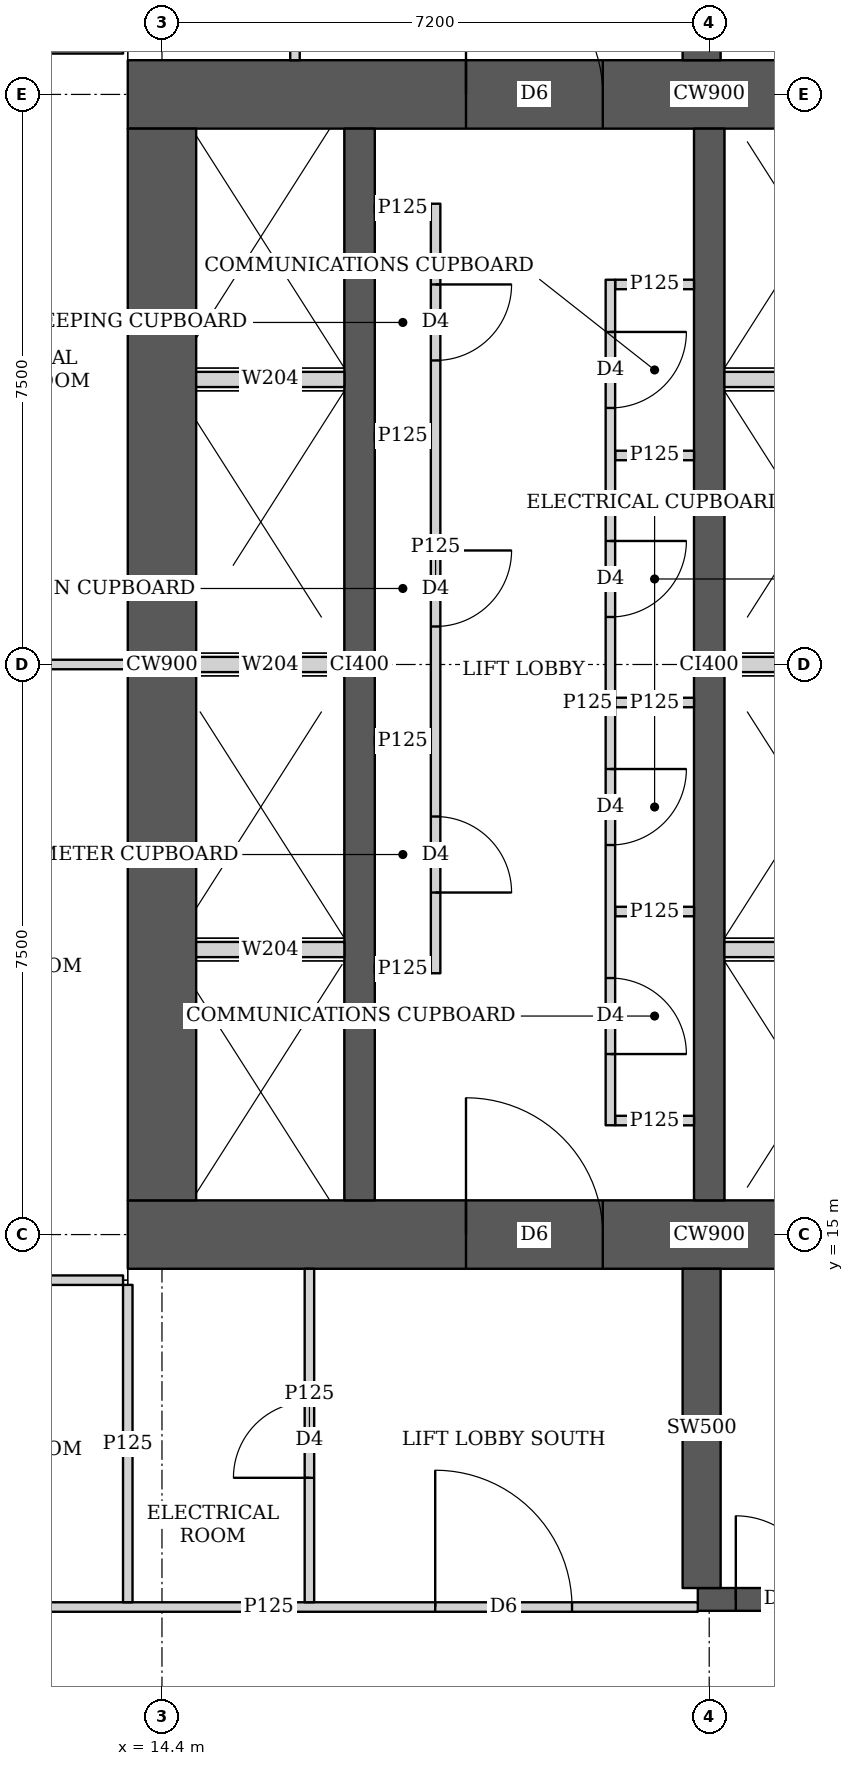
"""IFC4 building model, lengths in metres.
Left out: names, types, materials, properties, quantities, classifications, styles, units other than length and angle.
Written with IfcOpenShell. Run it as: python <this file> out.ifc"""

import sys

from ifc_helpers import new_model, si_unit, direction, frame, frame_2d, origin, place, context, subcontext, project, spatial, rectangle, extrude, element, fill, save


model = new_model("IFC4")
c1 = context("Model", 3, precision=1e-05, world=origin(), true_north=direction((0.0, 1.0)))
c2 = subcontext(c1, "Body", "Model", "MODEL_VIEW")
j1 = project(units=[si_unit("LENGTHUNIT", "METRE"), si_unit("PLANEANGLEUNIT", "RADIAN")], contexts=[c1])
p1 = place(None, origin())
s1 = spatial("IfcSite", under=j1, at=p1, CompositionType="ELEMENT")
p2 = place(p1, origin())
s2 = spatial("IfcBuilding", under=s1, at=p2, CompositionType="ELEMENT")
p3 = place(p2, frame((0.0, 0.0, 14.6)))
s3 = spatial("IfcBuildingStorey", under=s2, at=p3, CompositionType="ELEMENT", Elevation=14.6)
p4 = place(p3, frame((13.95, 15.0, 0.0), z_axis=(0.0, 0.0, 1.0), x_axis=(1.0, 0.0, 0.0)))
e1 = element("IfcWall", 1, at=p4, inside=s3, PredefinedType="SHEAR", context=c2, shape_type="SweptSolid", body=[
    extrude(rectangle(XDim=15.3, YDim=0.9, at=frame_2d((7.65, 0.0))), origin(), (0.0, 0.0, 1.0), 5.4),
])
p5 = place(p4, frame((4.45, 0.0, 0.0)))
e2 = element("IfcOpeningElement", 2, at=p5, cuts=e1, PredefinedType="OPENING", context=c2, shape_type="SweptSolid", body=[
    extrude(rectangle(XDim=1.8, YDim=2.1, at=frame_2d((0.9, 1.05))), frame((0.0, 0.46, 0.0), z_axis=(0.0, -1.0, 0.0), x_axis=(1.0, 0.0, 0.0)), (0.0, 0.0, 1.0), 0.92),
])
p6 = place(p4, frame((10.7, 0.0, 0.0)))
e3 = element("IfcOpeningElement", 3, at=p6, cuts=e1, PredefinedType="OPENING", context=c2, shape_type="SweptSolid", body=[
    extrude(rectangle(XDim=1.1, YDim=2.1, at=frame_2d((0.55, 1.05))), frame((0.0, 0.46, 0.0), z_axis=(0.0, -1.0, 0.0), x_axis=(1.0, 0.0, 0.0)), (0.0, 0.0, 1.0), 0.92),
])
p7 = place(p3, frame((13.95, 30.0, 0.0), z_axis=(0.0, 0.0, 1.0), x_axis=(1.0, 0.0, 0.0)))
e4 = element("IfcWall", 4, at=p7, inside=s3, PredefinedType="SHEAR", context=c2, shape_type="SweptSolid", body=[
    extrude(rectangle(XDim=15.3, YDim=0.9, at=frame_2d((7.65, 0.0))), origin(), (0.0, 0.0, 1.0), 5.4),
])
p8 = place(p7, frame((4.45, 0.0, 0.0)))
e5 = element("IfcOpeningElement", 5, at=p8, cuts=e4, PredefinedType="OPENING", context=c2, shape_type="SweptSolid", body=[
    extrude(rectangle(XDim=1.8, YDim=2.1, at=frame_2d((0.9, 1.05))), frame((0.0, 0.46, 0.0), z_axis=(0.0, -1.0, 0.0), x_axis=(1.0, 0.0, 0.0)), (0.0, 0.0, 1.0), 0.92),
])
p9 = place(p7, frame((10.7, 0.0, 0.0)))
e6 = element("IfcOpeningElement", 6, at=p9, cuts=e4, PredefinedType="OPENING", context=c2, shape_type="SweptSolid", body=[
    extrude(rectangle(XDim=1.1, YDim=2.1, at=frame_2d((0.55, 1.05))), frame((0.0, 0.46, 0.0), z_axis=(0.0, -1.0, 0.0), x_axis=(1.0, 0.0, 0.0)), (0.0, 0.0, 1.0), 0.92),
])
p10 = place(p3, frame((14.4, 15.45, 0.0), z_axis=(0.0, 0.0, 1.0), x_axis=(0.0, 1.0, 0.0)))
e7 = element("IfcWall", 7, at=p10, inside=s3, PredefinedType="SHEAR", context=c2, shape_type="SweptSolid", body=[
    extrude(rectangle(XDim=14.1, YDim=0.9, at=frame_2d((7.05, 0.0))), origin(), (0.0, 0.0, 1.0), 5.4),
])
for number, where, z_axis, x_axis in (
    (8, (17.0, 15.45, 0.0), (0.0, 0.0, 1.0), (0.0, 1.0, 0.0)),
    (9, (21.6, 15.45, 0.0), (0.0, 0.0, 1.0), (0.0, 1.0, 0.0)),
):
    element("IfcWall", number, at=place(p3, frame(where, z_axis=z_axis, x_axis=x_axis)), inside=s3, PredefinedType="SHEAR", context=c2, shape_type="SweptSolid", body=[
        extrude(rectangle(XDim=14.1, YDim=0.4, at=frame_2d((7.05, 0.0))), origin(), (0.0, 0.0, 1.0), 5.4),
    ])
p11 = place(p3, frame((21.45, 10.2, 0.0), z_axis=(0.0, 0.0, 1.0), x_axis=(1.0, 0.0, 0.0)))
e10 = element("IfcWall", 10, at=p11, inside=s3, PredefinedType="SHEAR", context=c2, shape_type="SweptSolid", body=[
    extrude(rectangle(XDim=7.5, YDim=0.3, at=frame_2d((3.75, 0.0))), origin(), (0.0, 0.0, 1.0), 5.4),
])
p12 = place(p11, frame((0.5, 0.0, 0.0)))
e11 = element("IfcOpeningElement", 11, at=p12, cuts=e10, PredefinedType="OPENING", context=c2, shape_type="SweptSolid", body=[
    extrude(rectangle(XDim=1.1, YDim=2.1, at=frame_2d((0.55, 1.05))), frame((0.0, 0.16, 0.0), z_axis=(0.0, -1.0, 0.0), x_axis=(1.0, 0.0, 0.0)), (0.0, 0.0, 1.0), 0.32),
])
for number, where, z_axis, x_axis in (
    (12, (21.5, 10.35, 0.0), (0.0, 0.0, 1.0), (0.0, 1.0, 0.0)),
    (13, (21.5, 30.45, 0.0), (0.0, 0.0, 1.0), (0.0, 1.0, 0.0)),
):
    element("IfcWall", number, at=place(p3, frame(where, z_axis=z_axis, x_axis=x_axis)), inside=s3, PredefinedType="SHEAR", context=c2, shape_type="SweptSolid", body=[
        extrude(rectangle(XDim=4.2, YDim=0.5, at=frame_2d((2.1, 0.0))), origin(), (0.0, 0.0, 1.0), 5.4),
    ])
p13 = place(p3, frame((10.163, 14.4, 0.0), z_axis=(0.0, 0.0, 1.0), x_axis=(1.0, 0.0, 0.0)))
e14 = element("IfcWall", 14, at=p13, inside=s3, PredefinedType="PARTITIONING", context=c2, shape_type="SweptSolid", body=[
    extrude(rectangle(XDim=3.725, YDim=0.125, at=frame_2d((1.862, 0.0))), origin(), (0.0, 0.0, 1.0), 3.5),
])
p14 = place(p3, frame((10.163, 22.5, 0.0), z_axis=(0.0, 0.0, 1.0), x_axis=(1.0, 0.0, 0.0)))
e15 = element("IfcWall", 15, at=p14, inside=s3, PredefinedType="PARTITIONING", context=c2, shape_type="SweptSolid", body=[
    extrude(rectangle(XDim=3.787, YDim=0.125, at=frame_2d((1.894, 0.0))), origin(), (0.0, 0.0, 1.0), 3.5),
])
p15 = place(p3, frame((10.163, 30.6, 0.0), z_axis=(0.0, 0.0, 1.0), x_axis=(1.0, 0.0, 0.0)))
e16 = element("IfcWall", 16, at=p15, inside=s3, PredefinedType="PARTITIONING", context=c2, shape_type="SweptSolid", body=[
    extrude(rectangle(XDim=3.725, YDim=0.125, at=frame_2d((1.862, 0.0))), origin(), (0.0, 0.0, 1.0), 3.5),
])
p16 = place(p3, frame((13.95, 10.163, 0.0), z_axis=(0.0, 0.0, 1.0), x_axis=(0.0, 1.0, 0.0)))
e17 = element("IfcWall", 17, at=p16, inside=s3, PredefinedType="PARTITIONING", context=c2, shape_type="SweptSolid", body=[
    extrude(rectangle(XDim=4.175, YDim=0.125, at=frame_2d((2.087, 0.0))), origin(), (0.0, 0.0, 1.0), 3.5),
])
p17 = place(p3, frame((10.163, 10.1, 0.0), z_axis=(0.0, 0.0, 1.0), x_axis=(1.0, 0.0, 0.0)))
e18 = element("IfcWall", 18, at=p17, inside=s3, PredefinedType="PARTITIONING", context=c2, shape_type="SweptSolid", body=[
    extrude(rectangle(XDim=11.287, YDim=0.125, at=frame_2d((5.644, 0.0))), origin(), (0.0, 0.0, 1.0), 3.1),
])
p18 = place(p17, frame((7.832, 0.0, 0.0)))
e19 = element("IfcOpeningElement", 19, at=p18, cuts=e18, PredefinedType="OPENING", context=c2, shape_type="SweptSolid", body=[
    extrude(rectangle(XDim=1.8, YDim=2.1, at=frame_2d((0.9, 1.05))), frame((0.0, 0.073, 0.0), z_axis=(0.0, -1.0, 0.0), x_axis=(1.0, 0.0, 0.0)), (0.0, 0.0, 1.0), 0.145),
])
p19 = place(p3, frame((16.34, 10.163, 0.0), z_axis=(0.0, 0.0, 1.0), x_axis=(0.0, 1.0, 0.0)))
e20 = element("IfcWall", 20, at=p19, inside=s3, PredefinedType="PARTITIONING", context=c2, shape_type="SweptSolid", body=[
    extrude(rectangle(XDim=4.387, YDim=0.125, at=frame_2d((2.193, 0.0))), origin(), (0.0, 0.0, 1.0), 5.1),
])
p20 = place(p19, frame((1.637, 0.0, 0.0)))
e21 = element("IfcOpeningElement", 21, at=p20, cuts=e20, PredefinedType="OPENING", context=c2, shape_type="SweptSolid", body=[
    extrude(rectangle(XDim=1.0, YDim=2.1, at=frame_2d((0.5, 1.05))), frame((0.0, 0.073, 0.0), z_axis=(0.0, -1.0, 0.0), x_axis=(1.0, 0.0, 0.0)), (0.0, 0.0, 1.0), 0.145),
])
p21 = place(p3, frame((16.15, 30.45, 0.0), z_axis=(0.0, 0.0, 1.0), x_axis=(0.0, 1.0, 0.0)))
e22 = element("IfcWall", 22, at=p21, inside=s3, PredefinedType="PARTITIONING", context=c2, shape_type="SweptSolid", body=[
    extrude(rectangle(XDim=4.387, YDim=0.125, at=frame_2d((2.193, 0.0))), origin(), (0.0, 0.0, 1.0), 5.1),
])
p22 = place(p21, frame((1.75, 0.0, 0.0)))
e23 = element("IfcOpeningElement", 23, at=p22, cuts=e22, PredefinedType="OPENING", context=c2, shape_type="SweptSolid", body=[
    extrude(rectangle(XDim=1.0, YDim=2.1, at=frame_2d((0.5, 1.05))), frame((0.0, 0.073, 0.0), z_axis=(0.0, -1.0, 0.0), x_axis=(1.0, 0.0, 0.0)), (0.0, 0.0, 1.0), 0.145),
])
p23 = place(p3, frame((20.3, 16.438, 0.0), z_axis=(0.0, 0.0, 1.0), x_axis=(0.0, 1.0, 0.0)))
e24 = element("IfcWall", 24, at=p23, inside=s3, PredefinedType="PARTITIONING", context=c2, shape_type="SweptSolid", body=[
    extrude(rectangle(XDim=11.124, YDim=0.125, at=frame_2d((5.562, 0.0))), origin(), (0.0, 0.0, 1.0), 5.1),
])
p24 = place(p23, frame((0.937, 0.0, 0.0)))
e25 = element("IfcOpeningElement", 25, at=p24, cuts=e24, PredefinedType="OPENING", context=c2, shape_type="SweptSolid", body=[
    extrude(rectangle(XDim=1.0, YDim=2.1, at=frame_2d((0.5, 1.05))), frame((0.0, 0.073, 0.0), z_axis=(0.0, -1.0, 0.0), x_axis=(1.0, 0.0, 0.0)), (0.0, 0.0, 1.0), 0.145),
])
p25 = place(p23, frame((3.687, 0.0, 0.0)))
e26 = element("IfcOpeningElement", 26, at=p25, cuts=e24, PredefinedType="OPENING", context=c2, shape_type="SweptSolid", body=[
    extrude(rectangle(XDim=1.0, YDim=2.1, at=frame_2d((0.5, 1.05))), frame((0.0, 0.073, 0.0), z_axis=(0.0, -1.0, 0.0), x_axis=(1.0, 0.0, 0.0)), (0.0, 0.0, 1.0), 0.145),
])
p26 = place(p23, frame((6.687, 0.0, 0.0)))
e27 = element("IfcOpeningElement", 27, at=p26, cuts=e24, PredefinedType="OPENING", context=c2, shape_type="SweptSolid", body=[
    extrude(rectangle(XDim=1.0, YDim=2.1, at=frame_2d((0.5, 1.05))), frame((0.0, 0.073, 0.0), z_axis=(0.0, -1.0, 0.0), x_axis=(1.0, 0.0, 0.0)), (0.0, 0.0, 1.0), 0.145),
])
p27 = place(p23, frame((9.437, 0.0, 0.0)))
e28 = element("IfcOpeningElement", 28, at=p27, cuts=e24, PredefinedType="OPENING", context=c2, shape_type="SweptSolid", body=[
    extrude(rectangle(XDim=1.0, YDim=2.1, at=frame_2d((0.5, 1.05))), frame((0.0, 0.073, 0.0), z_axis=(0.0, -1.0, 0.0), x_axis=(1.0, 0.0, 0.0)), (0.0, 0.0, 1.0), 0.145),
])
for number, where, z_axis, x_axis in (
    (29, (20.363, 16.5, 0.0), (0.0, 0.0, 1.0), (1.0, 0.0, 0.0)),
    (30, (20.363, 27.5, 0.0), (0.0, 0.0, 1.0), (1.0, 0.0, 0.0)),
    (31, (20.363, 19.25, 0.0), (0.0, 0.0, 1.0), (1.0, 0.0, 0.0)),
    (32, (20.363, 22.0, 0.0), (0.0, 0.0, 1.0), (1.0, 0.0, 0.0)),
    (33, (20.363, 25.25, 0.0), (0.0, 0.0, 1.0), (1.0, 0.0, 0.0)),
):
    element("IfcWall", number, at=place(p3, frame(where, z_axis=z_axis, x_axis=x_axis)), inside=s3, PredefinedType="PARTITIONING", context=c2, shape_type="SweptSolid", body=[
        extrude(rectangle(XDim=1.037, YDim=0.125, at=frame_2d((0.519, 0.0))), origin(), (0.0, 0.0, 1.0), 5.1),
    ])
p28 = place(p3, frame((18.0, 28.562, 0.0), z_axis=(0.0, 0.0, 1.0), x_axis=(0.0, -1.0, 0.0)))
e34 = element("IfcWall", 34, at=p28, inside=s3, PredefinedType="PARTITIONING", context=c2, shape_type="SweptSolid", body=[
    extrude(rectangle(XDim=10.124, YDim=0.125, at=frame_2d((5.062, 0.0))), origin(), (0.0, 0.0, 1.0), 5.1),
])
p29 = place(p28, frame((8.062, 0.0, 0.0)))
e35 = element("IfcOpeningElement", 35, at=p29, cuts=e34, PredefinedType="OPENING", context=c2, shape_type="SweptSolid", body=[
    extrude(rectangle(XDim=1.0, YDim=2.1, at=frame_2d((0.5, 1.05))), frame((0.0, 0.073, 0.0), z_axis=(0.0, -1.0, 0.0), x_axis=(1.0, 0.0, 0.0)), (0.0, 0.0, 1.0), 0.145),
])
p30 = place(p28, frame((4.562, 0.0, 0.0)))
e36 = element("IfcOpeningElement", 36, at=p30, cuts=e34, PredefinedType="OPENING", context=c2, shape_type="SweptSolid", body=[
    extrude(rectangle(XDim=1.0, YDim=2.1, at=frame_2d((0.5, 1.05))), frame((0.0, 0.073, 0.0), z_axis=(0.0, -1.0, 0.0), x_axis=(1.0, 0.0, 0.0)), (0.0, 0.0, 1.0), 0.145),
])
p31 = place(p28, frame((1.062, 0.0, 0.0)))
e37 = element("IfcOpeningElement", 37, at=p31, cuts=e34, PredefinedType="OPENING", context=c2, shape_type="SweptSolid", body=[
    extrude(rectangle(XDim=1.0, YDim=2.1, at=frame_2d((0.5, 1.05))), frame((0.0, 0.073, 0.0), z_axis=(0.0, -1.0, 0.0), x_axis=(1.0, 0.0, 0.0)), (0.0, 0.0, 1.0), 0.145),
])
for number, where, z_axis, x_axis in (
    (38, (17.2, 18.5, 0.0), (0.0, 0.0, 1.0), (1.0, 0.0, 0.0)),
    (39, (17.2, 28.5, 0.0), (0.0, 0.0, 1.0), (1.0, 0.0, 0.0)),
    (40, (17.2, 21.5, 0.0), (0.0, 0.0, 1.0), (1.0, 0.0, 0.0)),
    (41, (17.2, 25.5, 0.0), (0.0, 0.0, 1.0), (1.0, 0.0, 0.0)),
):
    element("IfcWall", number, at=place(p3, frame(where, z_axis=z_axis, x_axis=x_axis)), inside=s3, PredefinedType="PARTITIONING", context=c2, shape_type="SweptSolid", body=[
        extrude(rectangle(XDim=0.738, YDim=0.125, at=frame_2d((0.369, 0.0))), origin(), (0.0, 0.0, 1.0), 5.1),
    ])
p32 = place(p3, frame((14.85, 18.75, 0.0), z_axis=(0.0, 0.0, 1.0), x_axis=(1.0, 0.0, 0.0)))
e42 = element("IfcWall", 42, at=p32, inside=s3, PredefinedType="SOLIDWALL", context=c2, shape_type="SweptSolid", body=[
    extrude(rectangle(XDim=1.95, YDim=0.2, at=frame_2d((0.975, 0.0))), origin(), (0.0, 0.0, 1.0), 5.1),
])
p33 = place(p3, frame((21.8, 18.75, 0.0), z_axis=(0.0, 0.0, 1.0), x_axis=(1.0, 0.0, 0.0)))
e43 = element("IfcWall", 43, at=p33, inside=s3, PredefinedType="SOLIDWALL", context=c2, shape_type="SweptSolid", body=[
    extrude(rectangle(XDim=2.2, YDim=0.2, at=frame_2d((1.1, 0.0))), origin(), (0.0, 0.0, 1.0), 5.1),
])
p34 = place(p3, frame((14.85, 22.5, 0.0), z_axis=(0.0, 0.0, 1.0), x_axis=(1.0, 0.0, 0.0)))
e44 = element("IfcWall", 44, at=p34, inside=s3, PredefinedType="SOLIDWALL", context=c2, shape_type="SweptSolid", body=[
    extrude(rectangle(XDim=1.95, YDim=0.2, at=frame_2d((0.975, 0.0))), origin(), (0.0, 0.0, 1.0), 5.1),
])
p35 = place(p3, frame((21.8, 22.5, 0.0), z_axis=(0.0, 0.0, 1.0), x_axis=(1.0, 0.0, 0.0)))
e45 = element("IfcWall", 45, at=p35, inside=s3, PredefinedType="SOLIDWALL", context=c2, shape_type="SweptSolid", body=[
    extrude(rectangle(XDim=2.2, YDim=0.2, at=frame_2d((1.1, 0.0))), origin(), (0.0, 0.0, 1.0), 5.1),
])
p36 = place(p3, frame((14.85, 26.25, 0.0), z_axis=(0.0, 0.0, 1.0), x_axis=(1.0, 0.0, 0.0)))
e46 = element("IfcWall", 46, at=p36, inside=s3, PredefinedType="SOLIDWALL", context=c2, shape_type="SweptSolid", body=[
    extrude(rectangle(XDim=1.95, YDim=0.2, at=frame_2d((0.975, 0.0))), origin(), (0.0, 0.0, 1.0), 5.1),
])
p37 = place(p3, frame((21.8, 26.25, 0.0), z_axis=(0.0, 0.0, 1.0), x_axis=(1.0, 0.0, 0.0)))
e47 = element("IfcWall", 47, at=p37, inside=s3, PredefinedType="SOLIDWALL", context=c2, shape_type="SweptSolid", body=[
    extrude(rectangle(XDim=2.2, YDim=0.2, at=frame_2d((1.1, 0.0))), origin(), (0.0, 0.0, 1.0), 5.1),
])
p38 = place(p20, origin())
e48 = element("IfcDoor", 48, at=p38, inside=s3, OperationType="SINGLE_SWING_LEFT", PredefinedType="DOOR", context=c2, shape_type="SweptSolid", body=[
    extrude(rectangle(XDim=1.0, YDim=2.1, at=frame_2d((0.5, 1.05))), frame((0.0, 0.025, 0.0), z_axis=(0.0, -1.0, 0.0), x_axis=(1.0, 0.0, 0.0)), (0.0, 0.0, 1.0), 0.05),
])
fill(e21, e48)
p39 = place(p18, origin())
e49 = element("IfcDoor", 49, at=p39, inside=s3, OperationType="DOUBLE_DOOR_SINGLE_SWING", PredefinedType="DOOR", context=c2, shape_type="SweptSolid", body=[
    extrude(rectangle(XDim=1.8, YDim=2.1, at=frame_2d((0.9, 1.05))), frame((0.0, 0.025, 0.0), z_axis=(0.0, -1.0, 0.0), x_axis=(1.0, 0.0, 0.0)), (0.0, 0.0, 1.0), 0.05),
])
fill(e19, e49)
p40 = place(p24, origin())
e50 = element("IfcDoor", 50, at=p40, inside=s3, OperationType="SINGLE_SWING_RIGHT", PredefinedType="DOOR", context=c2, shape_type="SweptSolid", body=[
    extrude(rectangle(XDim=1.0, YDim=2.1, at=frame_2d((0.5, 1.05))), frame((0.0, 0.025, 0.0), z_axis=(0.0, -1.0, 0.0), x_axis=(1.0, 0.0, 0.0)), (0.0, 0.0, 1.0), 0.05),
])
fill(e25, e50)
p41 = place(p25, origin())
e51 = element("IfcDoor", 51, at=p41, inside=s3, OperationType="SINGLE_SWING_LEFT", PredefinedType="DOOR", context=c2, shape_type="SweptSolid", body=[
    extrude(rectangle(XDim=1.0, YDim=2.1, at=frame_2d((0.5, 1.05))), frame((0.0, 0.025, 0.0), z_axis=(0.0, -1.0, 0.0), x_axis=(1.0, 0.0, 0.0)), (0.0, 0.0, 1.0), 0.05),
])
fill(e26, e51)
p42 = place(p26, origin())
e52 = element("IfcDoor", 52, at=p42, inside=s3, OperationType="SINGLE_SWING_LEFT", PredefinedType="DOOR", context=c2, shape_type="SweptSolid", body=[
    extrude(rectangle(XDim=1.0, YDim=2.1, at=frame_2d((0.5, 1.05))), frame((0.0, 0.025, 0.0), z_axis=(0.0, -1.0, 0.0), x_axis=(1.0, 0.0, 0.0)), (0.0, 0.0, 1.0), 0.05),
])
fill(e27, e52)
p43 = place(p27, origin())
e53 = element("IfcDoor", 53, at=p43, inside=s3, OperationType="SINGLE_SWING_LEFT", PredefinedType="DOOR", context=c2, shape_type="SweptSolid", body=[
    extrude(rectangle(XDim=1.0, YDim=2.1, at=frame_2d((0.5, 1.05))), frame((0.0, 0.025, 0.0), z_axis=(0.0, -1.0, 0.0), x_axis=(1.0, 0.0, 0.0)), (0.0, 0.0, 1.0), 0.05),
])
fill(e28, e53)
p44 = place(p29, origin())
e54 = element("IfcDoor", 54, at=p44, inside=s3, OperationType="SINGLE_SWING_RIGHT", PredefinedType="DOOR", context=c2, shape_type="SweptSolid", body=[
    extrude(rectangle(XDim=1.0, YDim=2.1, at=frame_2d((0.5, 1.05))), frame((0.0, 0.025, 0.0), z_axis=(0.0, -1.0, 0.0), x_axis=(1.0, 0.0, 0.0)), (0.0, 0.0, 1.0), 0.05),
])
fill(e35, e54)
p45 = place(p30, origin())
e55 = element("IfcDoor", 55, at=p45, inside=s3, OperationType="SINGLE_SWING_LEFT", PredefinedType="DOOR", context=c2, shape_type="SweptSolid", body=[
    extrude(rectangle(XDim=1.0, YDim=2.1, at=frame_2d((0.5, 1.05))), frame((0.0, 0.025, 0.0), z_axis=(0.0, -1.0, 0.0), x_axis=(1.0, 0.0, 0.0)), (0.0, 0.0, 1.0), 0.05),
])
fill(e36, e55)
p46 = place(p31, origin())
e56 = element("IfcDoor", 56, at=p46, inside=s3, OperationType="SINGLE_SWING_LEFT", PredefinedType="DOOR", context=c2, shape_type="SweptSolid", body=[
    extrude(rectangle(XDim=1.0, YDim=2.1, at=frame_2d((0.5, 1.05))), frame((0.0, 0.025, 0.0), z_axis=(0.0, -1.0, 0.0), x_axis=(1.0, 0.0, 0.0)), (0.0, 0.0, 1.0), 0.05),
])
fill(e37, e56)
p47 = place(p5, origin())
e57 = element("IfcDoor", 57, at=p47, inside=s3, OperationType="DOUBLE_DOOR_SINGLE_SWING", PredefinedType="DOOR", context=c2, shape_type="SweptSolid", body=[
    extrude(rectangle(XDim=1.8, YDim=2.1, at=frame_2d((0.9, 1.05))), frame((0.0, 0.025, 0.0), z_axis=(0.0, -1.0, 0.0), x_axis=(1.0, 0.0, 0.0)), (0.0, 0.0, 1.0), 0.05),
])
fill(e2, e57)
p48 = place(p8, origin())
e58 = element("IfcDoor", 58, at=p48, inside=s3, OperationType="DOUBLE_DOOR_SINGLE_SWING", PredefinedType="DOOR", context=c2, shape_type="SweptSolid", body=[
    extrude(rectangle(XDim=1.8, YDim=2.1, at=frame_2d((0.9, 1.05))), frame((0.0, 0.025, 0.0), z_axis=(0.0, -1.0, 0.0), x_axis=(1.0, 0.0, 0.0)), (0.0, 0.0, 1.0), 0.05),
])
fill(e5, e58)
p49 = place(p12, origin())
e59 = element("IfcDoor", 59, at=p49, inside=s3, OperationType="SINGLE_SWING_LEFT", PredefinedType="DOOR", context=c2, shape_type="SweptSolid", body=[
    extrude(rectangle(XDim=1.1, YDim=2.1, at=frame_2d((0.55, 1.05))), frame((0.0, 0.025, 0.0), z_axis=(0.0, -1.0, 0.0), x_axis=(1.0, 0.0, 0.0)), (0.0, 0.0, 1.0), 0.05),
])
fill(e11, e59)
save(model, sys.argv[1])
